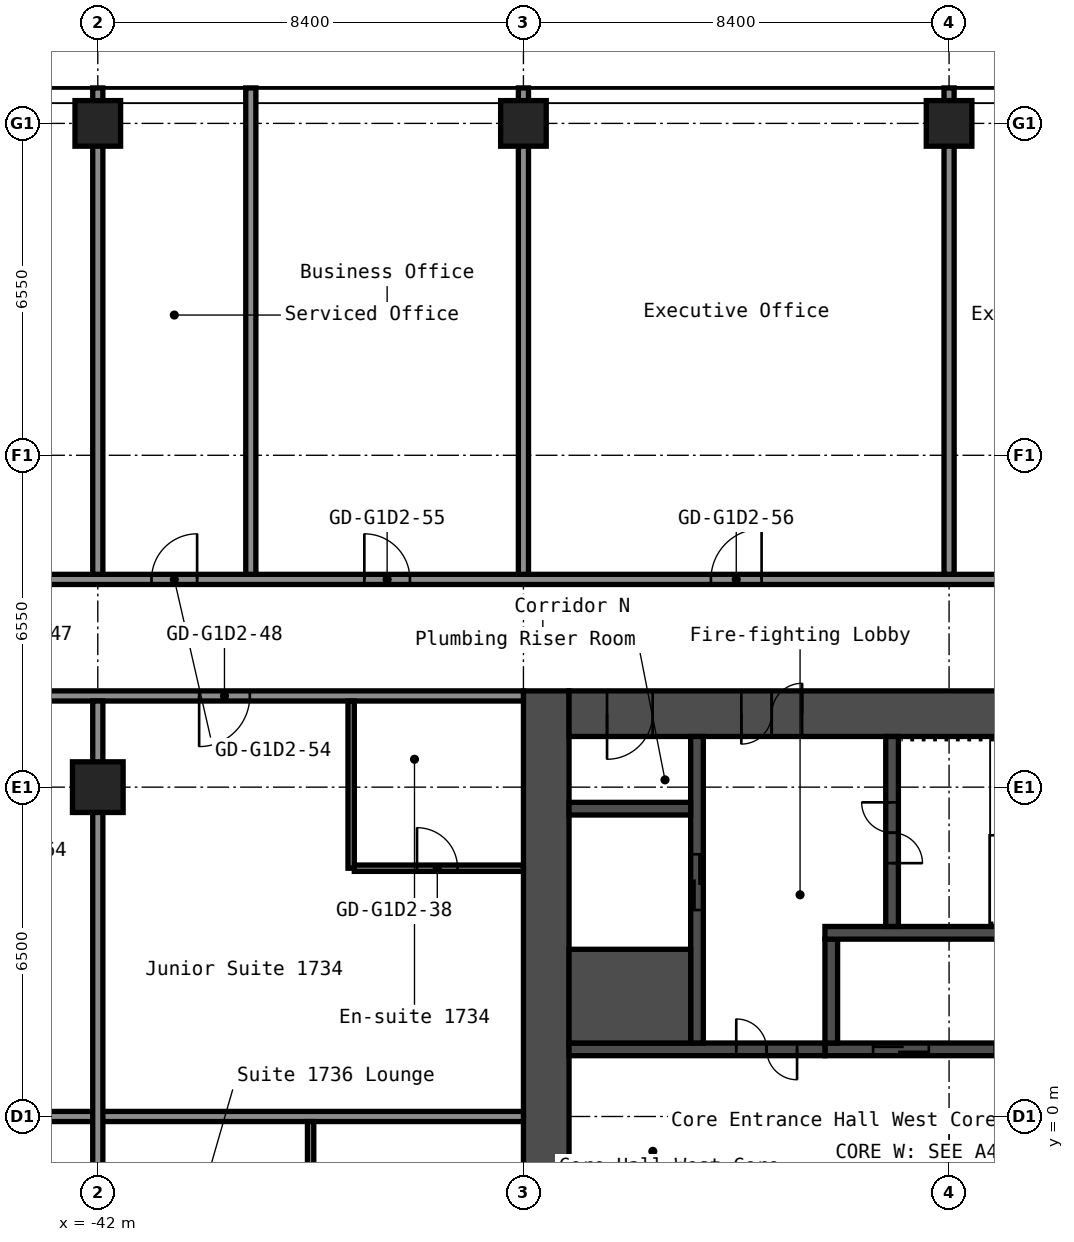
"""IFC4 building model, lengths in metres.
Left out: names, types, materials, properties, quantities, classifications, styles, units other than length and angle.
Written with IfcOpenShell. Run it as: python <this file> out.ifc"""

import sys

from ifc_helpers import new_model, si_unit, direction, frame, frame_2d, origin, origin_2d, place, context, subcontext, project, spatial, rectangle, hollow_rectangle, extrude, element, fill, save


model = new_model("IFC4")
c1 = context("Model", 3, precision=1e-05, world=origin(), true_north=direction((0.0, 1.0)))
c2 = subcontext(c1, "Body", "Model", "MODEL_VIEW")
j1 = project(units=[si_unit("LENGTHUNIT", "METRE"), si_unit("PLANEANGLEUNIT", "RADIAN")], contexts=[c1])
p1 = place(None, origin())
s1 = spatial("IfcSite", under=j1, at=p1, CompositionType="ELEMENT")
p2 = place(p1, origin())
s2 = spatial("IfcBuilding", under=s1, at=p2, CompositionType="ELEMENT")
p3 = place(p2, frame((0.0, 0.0, 61.4)))
s3 = spatial("IfcBuildingStorey", under=s2, at=p3, CompositionType="ELEMENT", Elevation=61.4)
p4 = place(p3, frame((-42.0, 6.5, 0.0), z_axis=(0.0, 0.0, 1.0), x_axis=(1.0, 0.0, 0.0)))
e1 = element("IfcColumn", 1, at=p4, inside=s3, PredefinedType="COLUMN", context=c2, shape_type="SweptSolid", body=[
    extrude(hollow_rectangle(XDim=1.0, YDim=1.0, WallThickness=0.04, at=origin_2d()), origin(), (0.0, 0.0, 1.0), 2.9),
])
for number, where, z_axis, x_axis in (
    (2, (-42.0, 19.6, 0.0), (0.0, 0.0, 1.0), (1.0, 0.0, 0.0)),
    (3, (-33.6, 19.6, 0.0), (0.0, 0.0, 1.0), (1.0, 0.0, 0.0)),
    (4, (-25.2, 19.6, 0.0), (0.0, 0.0, 1.0), (1.0, 0.0, 0.0)),
):
    element("IfcColumn", number, at=place(p3, frame(where, z_axis=z_axis, x_axis=x_axis)), inside=s3, PredefinedType="COLUMN", context=c2, shape_type="SweptSolid", body=[
        extrude(hollow_rectangle(XDim=0.9, YDim=0.9, WallThickness=0.036, at=origin_2d()), origin(), (0.0, 0.0, 1.0), 2.9),
    ])
p5 = place(p3, frame((-33.15, -8.4, 0.0), z_axis=(0.0, 0.0, 1.0), x_axis=(0.0, 1.0, 0.0)))
e5 = element("IfcWall", 5, at=p5, inside=s3, PredefinedType="SHEAR", context=c2, shape_type="SweptSolid", body=[
    extrude(rectangle(XDim=16.8, YDim=0.9, at=frame_2d((8.4, 0.0))), origin(), (0.0, 0.0, 1.0), 2.9),
])
p6 = place(p3, frame((-32.7, 7.95, 0.0), z_axis=(0.0, 0.0, 1.0), x_axis=(1.0, 0.0, 0.0)))
e6 = element("IfcWall", 6, at=p6, inside=s3, PredefinedType="SHEAR", context=c2, shape_type="SweptSolid", body=[
    extrude(rectangle(XDim=15.0, YDim=0.9, at=frame_2d((7.5, 0.0))), origin(), (0.0, 0.0, 1.0), 2.9),
])
p7 = place(p6, frame((3.4, 0.0, 0.0)))
e7 = element("IfcOpeningElement", 7, at=p7, cuts=e6, PredefinedType="OPENING", context=c2, shape_type="SweptSolid", body=[
    extrude(rectangle(XDim=1.2, YDim=2.1, at=frame_2d((0.6, 1.05))), frame((0.0, 0.46, 0.0), z_axis=(0.0, -1.0, 0.0), x_axis=(1.0, 0.0, 0.0)), (0.0, 0.0, 1.0), 0.92),
])
p8 = place(p6, frame((0.75, 0.0, 0.0)))
e8 = element("IfcOpeningElement", 8, at=p8, cuts=e6, PredefinedType="OPENING", context=c2, shape_type="SweptSolid", body=[
    extrude(rectangle(XDim=0.9, YDim=2.1, at=frame_2d((0.45, 1.05))), frame((0.0, 0.46, 0.0), z_axis=(0.0, -1.0, 0.0), x_axis=(1.0, 0.0, 0.0)), (0.0, 0.0, 1.0), 0.92),
])
p9 = place(p3, frame((-27.65, 1.325, 0.0), z_axis=(0.0, 0.0, 1.0), x_axis=(1.0, 0.0, 0.0)))
e9 = element("IfcWall", 9, at=p9, inside=s3, PredefinedType="SHEAR", context=c2, shape_type="SweptSolid", body=[
    extrude(rectangle(XDim=7.5, YDim=0.25, at=frame_2d((3.75, 0.0))), origin(), (0.0, 0.0, 1.0), 2.9),
])
p10 = place(p9, frame((5.75, 0.0, 0.0)))
e10 = element("IfcOpeningElement", 10, at=p10, cuts=e9, PredefinedType="OPENING", context=c2, shape_type="SweptSolid", body=[
    extrude(rectangle(XDim=1.1, YDim=2.1, at=frame_2d((0.55, 1.05))), frame((0.0, 0.135, 0.0), z_axis=(0.0, -1.0, 0.0), x_axis=(1.0, 0.0, 0.0)), (0.0, 0.0, 1.0), 0.27),
])
p11 = place(p9, frame((3.35, 0.0, 0.0)))
e11 = element("IfcOpeningElement", 11, at=p11, cuts=e9, PredefinedType="OPENING", context=c2, shape_type="SweptSolid", body=[
    extrude(rectangle(XDim=1.1, YDim=2.1, at=frame_2d((0.55, 1.05))), frame((0.0, 0.135, 0.0), z_axis=(0.0, -1.0, 0.0), x_axis=(1.0, 0.0, 0.0)), (0.0, 0.0, 1.0), 0.27),
])
p12 = place(p9, frame((0.95, 0.0, 0.0)))
e12 = element("IfcOpeningElement", 12, at=p12, cuts=e9, PredefinedType="OPENING", context=c2, shape_type="SweptSolid", body=[
    extrude(rectangle(XDim=1.1, YDim=2.1, at=frame_2d((0.55, 1.05))), frame((0.0, 0.135, 0.0), z_axis=(0.0, -1.0, 0.0), x_axis=(1.0, 0.0, 0.0)), (0.0, 0.0, 1.0), 0.27),
])
p13 = place(p3, frame((-27.525, 1.45, 0.0), z_axis=(0.0, 0.0, 1.0), x_axis=(0.0, 1.0, 0.0)))
e13 = element("IfcWall", 13, at=p13, inside=s3, PredefinedType="SHEAR", context=c2, shape_type="SweptSolid", body=[
    extrude(rectangle(XDim=2.05, YDim=0.25, at=frame_2d((1.025, 0.0))), origin(), (0.0, 0.0, 1.0), 2.9),
])
p14 = place(p3, frame((-27.65, 3.625, 0.0), z_axis=(0.0, 0.0, 1.0), x_axis=(1.0, 0.0, 0.0)))
e14 = element("IfcWall", 14, at=p14, inside=s3, PredefinedType="SHEAR", context=c2, shape_type="SweptSolid", body=[
    extrude(rectangle(XDim=7.5, YDim=0.25, at=frame_2d((3.75, 0.0))), origin(), (0.0, 0.0, 1.0), 2.9),
])
p15 = place(p3, frame((-26.325, 3.75, 0.0), z_axis=(0.0, 0.0, 1.0), x_axis=(0.0, 1.0, 0.0)))
e15 = element("IfcWall", 15, at=p15, inside=s3, PredefinedType="SHEAR", context=c2, shape_type="SweptSolid", body=[
    extrude(rectangle(XDim=3.75, YDim=0.25, at=frame_2d((1.875, 0.0))), origin(), (0.0, 0.0, 1.0), 2.9),
])
p16 = place(p15, frame((1.25, 0.0, 0.0)))
e16 = element("IfcOpeningElement", 16, at=p16, cuts=e15, PredefinedType="OPENING", context=c2, shape_type="SweptSolid", body=[
    extrude(rectangle(XDim=1.2, YDim=2.1, at=frame_2d((0.6, 1.05))), frame((0.0, 0.135, 0.0), z_axis=(0.0, -1.0, 0.0), x_axis=(1.0, 0.0, 0.0)), (0.0, 0.0, 1.0), 0.27),
])
p17 = place(p3, frame((-32.7, 1.325, 0.0), z_axis=(0.0, 0.0, 1.0), x_axis=(1.0, 0.0, 0.0)))
e17 = element("IfcWall", 17, at=p17, inside=s3, PredefinedType="SHEAR", context=c2, shape_type="SweptSolid", body=[
    extrude(rectangle(XDim=5.05, YDim=0.25, at=frame_2d((2.525, 0.0))), origin(), (0.0, 0.0, 1.0), 2.9),
])
p18 = place(p17, frame((3.3, 0.0, 0.0)))
e18 = element("IfcOpeningElement", 18, at=p18, cuts=e17, PredefinedType="OPENING", context=c2, shape_type="SweptSolid", body=[
    extrude(rectangle(XDim=1.2, YDim=2.1, at=frame_2d((0.6, 1.05))), frame((0.0, 0.135, 0.0), z_axis=(0.0, -1.0, 0.0), x_axis=(1.0, 0.0, 0.0)), (0.0, 0.0, 1.0), 0.27),
])
p19 = place(p3, frame((-30.175, 1.45, 0.0), z_axis=(0.0, 0.0, 1.0), x_axis=(0.0, 1.0, 0.0)))
e19 = element("IfcWall", 19, at=p19, inside=s3, PredefinedType="SHEAR", context=c2, shape_type="SweptSolid", body=[
    extrude(rectangle(XDim=6.05, YDim=0.25, at=frame_2d((3.025, 0.0))), origin(), (0.0, 0.0, 1.0), 2.9),
])
p20 = place(p19, frame((2.625, 0.0, 0.0)))
e20 = element("IfcOpeningElement", 20, at=p20, cuts=e19, PredefinedType="OPENING", context=c2, shape_type="SweptSolid", body=[
    extrude(rectangle(XDim=1.1, YDim=2.1, at=frame_2d((0.55, 1.05))), frame((0.0, 0.135, 0.0), z_axis=(0.0, -1.0, 0.0), x_axis=(1.0, 0.0, 0.0)), (0.0, 0.0, 1.0), 0.27),
])
p21 = place(p3, frame((-32.7, 2.375, 0.0), z_axis=(0.0, 0.0, 1.0), x_axis=(1.0, 0.0, 0.0)))
e21 = element("IfcWall", 21, at=p21, inside=s3, PredefinedType="SHEAR", context=c2, shape_type="SweptSolid", body=[
    extrude(rectangle(XDim=2.4, YDim=1.85, at=frame_2d((1.2, 0.0))), origin(), (0.0, 0.0, 1.0), 2.9),
])
p22 = place(p3, frame((-32.7, 6.075, 0.0), z_axis=(0.0, 0.0, 1.0), x_axis=(1.0, 0.0, 0.0)))
e22 = element("IfcWall", 22, at=p22, inside=s3, PredefinedType="SHEAR", context=c2, shape_type="SweptSolid", body=[
    extrude(rectangle(XDim=2.4, YDim=0.25, at=frame_2d((1.2, 0.0))), origin(), (0.0, 0.0, 1.0), 2.9),
])
p23 = place(p3, frame((-48.5, 0.0, 0.0), z_axis=(0.0, 0.0, 1.0), x_axis=(1.0, 0.0, 0.0)))
e23 = element("IfcWall", 23, at=p23, inside=s3, PredefinedType="PARTITIONING", context=c2, shape_type="SweptSolid", body=[
    extrude(rectangle(XDim=14.9, YDim=0.2, at=frame_2d((7.45, 0.0))), origin(), (0.0, 0.0, 1.0), 2.9),
])
p24 = place(p3, frame((-36.938, 4.9, 0.0), z_axis=(0.0, 0.0, 1.0), x_axis=(1.0, 0.0, 0.0)))
e24 = element("IfcWall", 24, at=p24, inside=s3, PredefinedType="PARTITIONING", context=c2, shape_type="SweptSolid", body=[
    extrude(rectangle(XDim=3.337, YDim=0.125, at=frame_2d((1.669, 0.0))), origin(), (0.0, 0.0, 1.0), 2.9),
])
p25 = place(p24, frame((1.238, 0.0, 0.0)))
e25 = element("IfcOpeningElement", 25, at=p25, cuts=e24, PredefinedType="OPENING", context=c2, shape_type="SweptSolid", body=[
    extrude(rectangle(XDim=0.8, YDim=2.1, at=frame_2d((0.4, 1.05))), frame((0.0, 0.073, 0.0), z_axis=(0.0, -1.0, 0.0), x_axis=(1.0, 0.0, 0.0)), (0.0, 0.0, 1.0), 0.145),
])
p26 = place(p3, frame((-48.6, 8.3, 0.0), z_axis=(0.0, 0.0, 1.0), x_axis=(1.0, 0.0, 0.0)))
e26 = element("IfcWall", 26, at=p26, inside=s3, PredefinedType="PARTITIONING", context=c2, shape_type="SweptSolid", body=[
    extrude(rectangle(XDim=15.0, YDim=0.2, at=frame_2d((7.5, 0.0))), origin(), (0.0, 0.0, 1.0), 2.9),
])
p27 = place(p26, frame((4.45, 0.0, 0.0)))
e27 = element("IfcOpeningElement", 27, at=p27, cuts=e26, PredefinedType="OPENING", context=c2, shape_type="SweptSolid", body=[
    extrude(rectangle(XDim=1.0, YDim=2.1, at=frame_2d((0.5, 1.05))), frame((0.0, 0.11, 0.0), z_axis=(0.0, -1.0, 0.0), x_axis=(1.0, 0.0, 0.0)), (0.0, 0.0, 1.0), 0.22),
])
p28 = place(p26, frame((8.6, 0.0, 0.0)))
e28 = element("IfcOpeningElement", 28, at=p28, cuts=e26, PredefinedType="OPENING", context=c2, shape_type="SweptSolid", body=[
    extrude(rectangle(XDim=1.0, YDim=2.1, at=frame_2d((0.5, 1.05))), frame((0.0, 0.11, 0.0), z_axis=(0.0, -1.0, 0.0), x_axis=(1.0, 0.0, 0.0)), (0.0, 0.0, 1.0), 0.22),
])
p29 = place(p3, frame((-51.1, 10.6, 0.0), z_axis=(0.0, 0.0, 1.0), x_axis=(1.0, 0.0, 0.0)))
e29 = element("IfcWall", 29, at=p29, inside=s3, PredefinedType="PARTITIONING", context=c2, shape_type="SweptSolid", body=[
    extrude(rectangle(XDim=34.3, YDim=0.2, at=frame_2d((17.15, 0.0))), origin(), (0.0, 0.0, 1.0), 2.9),
])
p30 = place(p29, frame((4.2, 0.0, 0.0)))
e30 = element("IfcOpeningElement", 30, at=p30, cuts=e29, PredefinedType="OPENING", context=c2, shape_type="SweptSolid", body=[
    extrude(rectangle(XDim=1.0, YDim=2.1, at=frame_2d((0.5, 1.05))), frame((0.0, 0.11, 0.0), z_axis=(0.0, -1.0, 0.0), x_axis=(1.0, 0.0, 0.0)), (0.0, 0.0, 1.0), 0.22),
])
p31 = place(p29, frame((10.16, 0.0, 0.0)))
e31 = element("IfcOpeningElement", 31, at=p31, cuts=e29, PredefinedType="OPENING", context=c2, shape_type="SweptSolid", body=[
    extrude(rectangle(XDim=0.9, YDim=2.1, at=frame_2d((0.45, 1.05))), frame((0.0, 0.11, 0.0), z_axis=(0.0, -1.0, 0.0), x_axis=(1.0, 0.0, 0.0)), (0.0, 0.0, 1.0), 0.22),
])
p32 = place(p29, frame((14.36, 0.0, 0.0)))
e32 = element("IfcOpeningElement", 32, at=p32, cuts=e29, PredefinedType="OPENING", context=c2, shape_type="SweptSolid", body=[
    extrude(rectangle(XDim=0.9, YDim=2.1, at=frame_2d((0.45, 1.05))), frame((0.0, 0.11, 0.0), z_axis=(0.0, -1.0, 0.0), x_axis=(1.0, 0.0, 0.0)), (0.0, 0.0, 1.0), 0.22),
])
p33 = place(p29, frame((21.2, 0.0, 0.0)))
e33 = element("IfcOpeningElement", 33, at=p33, cuts=e29, PredefinedType="OPENING", context=c2, shape_type="SweptSolid", body=[
    extrude(rectangle(XDim=1.0, YDim=2.1, at=frame_2d((0.5, 1.05))), frame((0.0, 0.11, 0.0), z_axis=(0.0, -1.0, 0.0), x_axis=(1.0, 0.0, 0.0)), (0.0, 0.0, 1.0), 0.22),
])
p34 = place(p29, frame((27.72, 0.0, 0.0)))
e34 = element("IfcOpeningElement", 34, at=p34, cuts=e29, PredefinedType="OPENING", context=c2, shape_type="SweptSolid", body=[
    extrude(rectangle(XDim=0.9, YDim=2.1, at=frame_2d((0.45, 1.05))), frame((0.0, 0.11, 0.0), z_axis=(0.0, -1.0, 0.0), x_axis=(1.0, 0.0, 0.0)), (0.0, 0.0, 1.0), 0.22),
])
p35 = place(p29, frame((31.92, 0.0, 0.0)))
e35 = element("IfcOpeningElement", 35, at=p35, cuts=e29, PredefinedType="OPENING", context=c2, shape_type="SweptSolid", body=[
    extrude(rectangle(XDim=0.9, YDim=2.1, at=frame_2d((0.45, 1.05))), frame((0.0, 0.11, 0.0), z_axis=(0.0, -1.0, 0.0), x_axis=(1.0, 0.0, 0.0)), (0.0, 0.0, 1.0), 0.22),
])
p36 = place(p3, frame((-42.0, -8.2, 0.0), z_axis=(0.0, 0.0, 1.0), x_axis=(0.0, 1.0, 0.0)))
e36 = element("IfcWall", 36, at=p36, inside=s3, PredefinedType="PARTITIONING", context=c2, shape_type="SweptSolid", body=[
    extrude(rectangle(XDim=16.4, YDim=0.2, at=frame_2d((8.2, 0.0))), origin(), (0.0, 0.0, 1.0), 2.9),
])
for number, where, z_axis, x_axis in (
    (37, (-42.0, 10.7, 0.0), (0.0, 0.0, 1.0), (0.0, 1.0, 0.0)),
    (38, (-38.98, 10.7, 0.0), (0.0, 0.0, 1.0), (0.0, 1.0, 0.0)),
):
    element("IfcWall", number, at=place(p3, frame(where, z_axis=z_axis, x_axis=x_axis)), inside=s3, PredefinedType="PARTITIONING", context=c2, shape_type="SweptSolid", body=[
        extrude(rectangle(XDim=9.6, YDim=0.2, at=frame_2d((4.8, 0.0))), origin(), (0.0, 0.0, 1.0), 2.9),
    ])
p37 = place(p3, frame((-37.8, -8.2, 0.0), z_axis=(0.0, 0.0, 1.0), x_axis=(0.0, 1.0, 0.0)))
e39 = element("IfcWall", 39, at=p37, inside=s3, PredefinedType="PARTITIONING", context=c2, shape_type="SweptSolid", body=[
    extrude(rectangle(XDim=8.1, YDim=0.125, at=frame_2d((4.05, 0.0))), origin(), (0.0, 0.0, 1.0), 2.9),
])
p38 = place(p37, frame((4.05, 0.0, 0.0)))
e40 = element("IfcOpeningElement", 40, at=p38, cuts=e39, PredefinedType="OPENING", context=c2, shape_type="SweptSolid", body=[
    extrude(rectangle(XDim=0.9, YDim=2.1, at=frame_2d((0.45, 1.05))), frame((0.0, 0.073, 0.0), z_axis=(0.0, -1.0, 0.0), x_axis=(1.0, 0.0, 0.0)), (0.0, 0.0, 1.0), 0.145),
])
p39 = place(p3, frame((-37.0, 4.9, 0.0), z_axis=(0.0, 0.0, 1.0), x_axis=(0.0, 1.0, 0.0)))
e41 = element("IfcWall", 41, at=p39, inside=s3, PredefinedType="PARTITIONING", context=c2, shape_type="SweptSolid", body=[
    extrude(rectangle(XDim=3.3, YDim=0.125, at=frame_2d((1.65, 0.0))), origin(), (0.0, 0.0, 1.0), 2.9),
])
for number, where, z_axis, x_axis in (
    (42, (-33.6, 10.7, 0.0), (0.0, 0.0, 1.0), (0.0, 1.0, 0.0)),
    (43, (-25.2, 10.7, 0.0), (0.0, 0.0, 1.0), (0.0, 1.0, 0.0)),
):
    element("IfcWall", number, at=place(p3, frame(where, z_axis=z_axis, x_axis=x_axis)), inside=s3, PredefinedType="PARTITIONING", context=c2, shape_type="SweptSolid", body=[
        extrude(rectangle(XDim=9.6, YDim=0.2, at=frame_2d((4.8, 0.0))), origin(), (0.0, 0.0, 1.0), 2.9),
    ])
p40 = place(p7, origin())
e44 = element("IfcDoor", 44, at=p40, inside=s3, OperationType="DOUBLE_DOOR_SINGLE_SWING", PredefinedType="DOOR", context=c2, shape_type="SweptSolid", body=[
    extrude(rectangle(XDim=1.2, YDim=2.1, at=frame_2d((0.6, 1.05))), frame((0.0, 0.025, 0.0), z_axis=(0.0, -1.0, 0.0), x_axis=(1.0, 0.0, 0.0)), (0.0, 0.0, 1.0), 0.05),
])
fill(e7, e44)
p41 = place(p8, origin())
e45 = element("IfcDoor", 45, at=p41, inside=s3, OperationType="SINGLE_SWING_LEFT", PredefinedType="DOOR", context=c2, shape_type="SweptSolid", body=[
    extrude(rectangle(XDim=0.9, YDim=2.1, at=frame_2d((0.45, 1.05))), frame((0.0, 0.025, 0.0), z_axis=(0.0, -1.0, 0.0), x_axis=(1.0, 0.0, 0.0)), (0.0, 0.0, 1.0), 0.05),
])
fill(e8, e45)
p42 = place(p16, origin())
e46 = element("IfcDoor", 46, at=p42, inside=s3, OperationType="DOUBLE_DOOR_SINGLE_SWING", PredefinedType="DOOR", context=c2, shape_type="SweptSolid", body=[
    extrude(rectangle(XDim=1.2, YDim=2.1, at=frame_2d((0.6, 1.05))), frame((0.0, 0.025, 0.0), z_axis=(0.0, -1.0, 0.0), x_axis=(1.0, 0.0, 0.0)), (0.0, 0.0, 1.0), 0.05),
])
fill(e16, e46)
p43 = place(p18, origin())
e47 = element("IfcDoor", 47, at=p43, inside=s3, OperationType="DOUBLE_DOOR_SINGLE_SWING", PredefinedType="DOOR", context=c2, shape_type="SweptSolid", body=[
    extrude(rectangle(XDim=1.2, YDim=2.1, at=frame_2d((0.6, 1.05))), frame((0.0, 0.025, 0.0), z_axis=(0.0, -1.0, 0.0), x_axis=(1.0, 0.0, 0.0)), (0.0, 0.0, 1.0), 0.05),
])
fill(e18, e47)
p44 = place(p12, origin())
e48 = element("IfcDoor", 48, at=p44, inside=s3, OperationType="DOUBLE_DOOR_SLIDING", PredefinedType="DOOR", context=c2, shape_type="SweptSolid", body=[
    extrude(rectangle(XDim=1.1, YDim=2.1, at=frame_2d((0.55, 1.05))), frame((0.0, 0.025, 0.0), z_axis=(0.0, -1.0, 0.0), x_axis=(1.0, 0.0, 0.0)), (0.0, 0.0, 1.0), 0.05),
])
fill(e12, e48)
p45 = place(p20, origin())
e49 = element("IfcDoor", 49, at=p45, inside=s3, OperationType="DOUBLE_DOOR_SLIDING", PredefinedType="DOOR", context=c2, shape_type="SweptSolid", body=[
    extrude(rectangle(XDim=1.1, YDim=2.1, at=frame_2d((0.55, 1.05))), frame((0.0, 0.025, 0.0), z_axis=(0.0, -1.0, 0.0), x_axis=(1.0, 0.0, 0.0)), (0.0, 0.0, 1.0), 0.05),
])
fill(e20, e49)
p46 = place(p25, origin())
e50 = element("IfcDoor", 50, at=p46, inside=s3, OperationType="SINGLE_SWING_RIGHT", PredefinedType="DOOR", context=c2, shape_type="SweptSolid", body=[
    extrude(rectangle(XDim=0.8, YDim=2.1, at=frame_2d((0.4, 1.05))), frame((0.0, 0.025, 0.0), z_axis=(0.0, -1.0, 0.0), x_axis=(1.0, 0.0, 0.0)), (0.0, 0.0, 1.0), 0.05),
])
fill(e25, e50)
p47 = place(p28, origin())
e51 = element("IfcDoor", 51, at=p47, inside=s3, OperationType="SINGLE_SWING_LEFT", PredefinedType="DOOR", context=c2, shape_type="SweptSolid", body=[
    extrude(rectangle(XDim=1.0, YDim=2.1, at=frame_2d((0.5, 1.05))), frame((0.0, 0.025, 0.0), z_axis=(0.0, -1.0, 0.0), x_axis=(1.0, 0.0, 0.0)), (0.0, 0.0, 1.0), 0.05),
])
fill(e28, e51)
p48 = place(p31, origin())
e52 = element("IfcDoor", 52, at=p48, inside=s3, OperationType="SINGLE_SWING_LEFT", PredefinedType="DOOR", context=c2, shape_type="SweptSolid", body=[
    extrude(rectangle(XDim=0.9, YDim=2.1, at=frame_2d((0.45, 1.05))), frame((0.0, 0.025, 0.0), z_axis=(0.0, -1.0, 0.0), x_axis=(1.0, 0.0, 0.0)), (0.0, 0.0, 1.0), 0.05),
])
fill(e31, e52)
p49 = place(p32, origin())
e53 = element("IfcDoor", 53, at=p49, inside=s3, OperationType="SINGLE_SWING_RIGHT", PredefinedType="DOOR", context=c2, shape_type="SweptSolid", body=[
    extrude(rectangle(XDim=0.9, YDim=2.1, at=frame_2d((0.45, 1.05))), frame((0.0, 0.025, 0.0), z_axis=(0.0, -1.0, 0.0), x_axis=(1.0, 0.0, 0.0)), (0.0, 0.0, 1.0), 0.05),
])
fill(e32, e53)
p50 = place(p33, origin())
e54 = element("IfcDoor", 54, at=p50, inside=s3, OperationType="SINGLE_SWING_LEFT", PredefinedType="DOOR", context=c2, shape_type="SweptSolid", body=[
    extrude(rectangle(XDim=1.0, YDim=2.1, at=frame_2d((0.5, 1.05))), frame((0.0, 0.025, 0.0), z_axis=(0.0, -1.0, 0.0), x_axis=(1.0, 0.0, 0.0)), (0.0, 0.0, 1.0), 0.05),
])
fill(e33, e54)
save(model, sys.argv[1])
